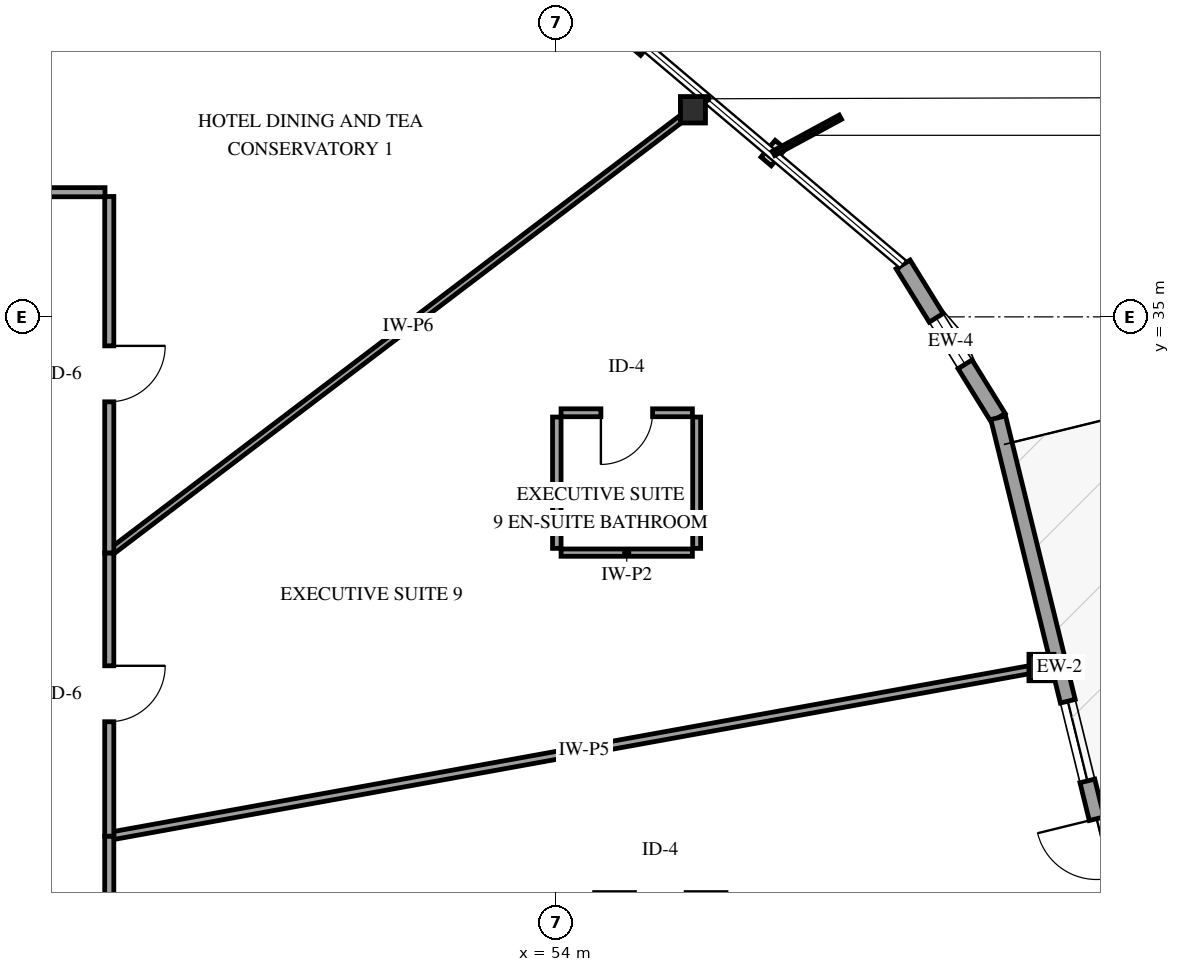
"""IFC4 building model, lengths in metres.
Left out: names, types, materials, properties, quantities, classifications, styles, units other than length and angle.
Written with IfcOpenShell. Run it as: python <this file> out.ifc"""

import sys

from ifc_helpers import new_model, si_unit, direction, frame, frame_2d, origin, origin_2d, place, context, subcontext, project, spatial, rectangle, i_section, extrude, element, fill, save


model = new_model("IFC4")
c1 = context("Model", 3, precision=1e-05, world=origin(), true_north=direction((0.0, 1.0)))
c2 = subcontext(c1, "Body", "Model", "MODEL_VIEW")
j1 = project(units=[si_unit("LENGTHUNIT", "METRE"), si_unit("PLANEANGLEUNIT", "RADIAN")], contexts=[c1])
p1 = place(None, origin())
s1 = spatial("IfcSite", under=j1, at=p1, CompositionType="ELEMENT")
p2 = place(p1, origin())
s2 = spatial("IfcBuilding", under=s1, at=p2, CompositionType="ELEMENT")
p3 = place(p2, frame((0.0, 0.0, 153.4)))
s3 = spatial("IfcBuildingStorey", under=s2, at=p3, CompositionType="ELEMENT", Elevation=153.4)
for number, where, z_axis, x_axis in (
    (1, (61.98, 29.234, 0.0), (0.0, 0.0, 1.0), (1.0, 0.0, 0.0)),
    (2, (56.249, 38.406, 0.0), (0.0, 0.0, 1.0), (1.0, 0.0, 0.0)),
):
    element("IfcColumn", number, at=place(p3, frame(where, z_axis=z_axis, x_axis=x_axis)), inside=s3, PredefinedType="COLUMN", context=c2, shape_type="SweptSolid", body=[
        extrude(i_section(OverallWidth=0.412, OverallDepth=0.435, WebThickness=0.036, FlangeThickness=0.057, FilletRadius=0.038, at=origin_2d()), origin(), (0.0, 0.0, 1.0), 3.6),
    ])
p4 = place(p3, frame((61.268, 33.342, 0.0), z_axis=(0.0, 0.0, 1.0), x_axis=(-0.526955124945, 0.849893108746, 0.0)))
e3 = element("IfcWall", 3, at=p4, inside=s3, PredefinedType="SOLIDWALL", context=c2, shape_type="SweptSolid", body=[
    extrude(rectangle(XDim=2.967, YDim=0.27, at=frame_2d((1.483, 0.0))), origin(), (0.0, 0.0, 1.0), 2.679),
])
p5 = place(p4, frame((1.033, 0.0, 0.75)))
e4 = element("IfcOpeningElement", 4, at=p5, cuts=e3, PredefinedType="OPENING", context=c2, shape_type="SweptSolid", body=[
    extrude(rectangle(XDim=0.9, YDim=1.5, at=frame_2d((0.45, 0.75))), frame((0.0, 0.145, 0.0), z_axis=(0.0, -1.0, 0.0), x_axis=(1.0, 0.0, 0.0)), (0.0, 0.0, 1.0), 0.29),
])
p6 = place(p3, frame((63.282, 25.145, 0.0), z_axis=(0.0, 0.0, 1.0), x_axis=(-0.238545314463, 0.971131367503, 0.0)))
e5 = element("IfcWall", 5, at=p6, inside=s3, PredefinedType="SOLIDWALL", context=c2, shape_type="SweptSolid", body=[
    extrude(rectangle(XDim=8.44, YDim=0.25, at=frame_2d((4.22, 0.0))), origin(), (0.0, 0.0, 1.0), 2.679),
])
p7 = place(p6, frame((0.65, 0.0, 0.0)))
e6 = element("IfcOpeningElement", 6, at=p7, cuts=e5, PredefinedType="OPENING", context=c2, shape_type="SweptSolid", body=[
    extrude(rectangle(XDim=1.0, YDim=2.15, at=frame_2d((0.5, 1.075))), frame((0.0, 0.135, 0.0), z_axis=(0.0, -1.0, 0.0), x_axis=(1.0, 0.0, 0.0)), (0.0, 0.0, 1.0), 0.27),
])
p8 = place(p6, frame((2.29, 0.0, 0.72)))
e7 = element("IfcOpeningElement", 7, at=p8, cuts=e5, PredefinedType="OPENING", context=c2, shape_type="SweptSolid", body=[
    extrude(rectangle(XDim=1.35, YDim=1.65, at=frame_2d((0.675, 0.825))), frame((0.0, 0.135, 0.0), z_axis=(0.0, -1.0, 0.0), x_axis=(1.0, 0.0, 0.0)), (0.0, 0.0, 1.0), 0.27),
])
p9 = place(p3, frame((62.265, 29.285, 0.0), z_axis=(0.0, 0.0, 1.0), x_axis=(-0.984004770571, -0.17814211039, 0.0)))
e8 = element("IfcWall", 8, at=p9, inside=s3, PredefinedType="PARTITIONING", context=c2, shape_type="SweptSolid", body=[
    extrude(rectangle(XDim=15.869, YDim=0.13, at=frame_2d((7.935, 0.0))), origin(), (0.0, 0.0, 1.0), 2.595),
])
p10 = place(p3, frame((46.65, 31.115, 0.0), z_axis=(0.0, 0.0, 1.0), x_axis=(0.796350735968, 0.604835105895, 0.0)))
e9 = element("IfcWall", 9, at=p10, inside=s3, PredefinedType="PARTITIONING", context=c2, shape_type="SweptSolid", body=[
    extrude(rectangle(XDim=12.349, YDim=0.11, at=frame_2d((6.174, 0.0))), origin(), (0.0, 0.0, 1.0), 3.3),
])
p11 = place(p3, frame((46.65, 36.98, 0.0), z_axis=(0.0, 0.0, 1.0), x_axis=(0.0, -1.0, 0.0)))
e10 = element("IfcWall", 10, at=p11, inside=s3, PredefinedType="PARTITIONING", context=c2, shape_type="SweptSolid", body=[
    extrude(rectangle(XDim=5.865, YDim=0.15, at=frame_2d((2.933, 0.0))), origin(), (0.0, 0.0, 1.0), 3.3),
])
p12 = place(p11, frame((2.457, 0.0, 0.0)))
e11 = element("IfcOpeningElement", 11, at=p12, cuts=e10, PredefinedType="OPENING", context=c2, shape_type="SweptSolid", body=[
    extrude(rectangle(XDim=0.92, YDim=2.12, at=frame_2d((0.46, 1.06))), frame((0.0, 0.085, 0.0), z_axis=(0.0, -1.0, 0.0), x_axis=(1.0, 0.0, 0.0)), (0.0, 0.0, 1.0), 0.17),
])
p13 = place(p3, frame((46.65, 31.115, 0.0), z_axis=(0.0, 0.0, 1.0), x_axis=(0.0, -1.0, 0.0)))
e12 = element("IfcWall", 12, at=p13, inside=s3, PredefinedType="PARTITIONING", context=c2, shape_type="SweptSolid", body=[
    extrude(rectangle(XDim=4.657, YDim=0.15, at=frame_2d((2.329, 0.0))), origin(), (0.0, 0.0, 1.0), 3.3),
])
p14 = place(p13, frame((1.853, 0.0, 0.0)))
e13 = element("IfcOpeningElement", 13, at=p14, cuts=e12, PredefinedType="OPENING", context=c2, shape_type="SweptSolid", body=[
    extrude(rectangle(XDim=0.92, YDim=2.12, at=frame_2d((0.46, 1.06))), frame((0.0, 0.085, 0.0), z_axis=(0.0, -1.0, 0.0), x_axis=(1.0, 0.0, 0.0)), (0.0, 0.0, 1.0), 0.17),
])
p15 = place(p3, frame((46.65, 26.458, 0.0), z_axis=(0.0, 0.0, 1.0), x_axis=(0.0, -1.0, 0.0)))
e14 = element("IfcWall", 14, at=p15, inside=s3, PredefinedType="PARTITIONING", context=c2, shape_type="SweptSolid", body=[
    extrude(rectangle(XDim=3.79, YDim=0.15, at=frame_2d((1.895, 0.0))), origin(), (0.0, 0.0, 1.0), 3.3),
])
p16 = place(p15, frame((1.42, 0.0, 0.0)))
e15 = element("IfcOpeningElement", 15, at=p16, cuts=e14, PredefinedType="OPENING", context=c2, shape_type="SweptSolid", body=[
    extrude(rectangle(XDim=0.92, YDim=2.12, at=frame_2d((0.46, 1.06))), frame((0.0, 0.085, 0.0), z_axis=(0.0, -1.0, 0.0), x_axis=(1.0, 0.0, 0.0)), (0.0, 0.0, 1.0), 0.17),
])
p17 = place(p3, frame((43.27, 37.05, 0.0), z_axis=(0.0, 0.0, 1.0), x_axis=(1.0, 0.0, 0.0)))
e16 = element("IfcWall", 16, at=p17, inside=s3, PredefinedType="PARTITIONING", context=c2, shape_type="SweptSolid", body=[
    extrude(rectangle(XDim=3.31, YDim=0.15, at=frame_2d((1.655, 0.0))), origin(), (0.0, 0.0, 1.0), 3.3),
])
p18 = place(p3, frame((56.24, 33.423, 0.0), z_axis=(0.0, 0.0, 1.0), x_axis=(-1.0, 0.0, 0.0)))
e17 = element("IfcWall", 17, at=p18, inside=s3, PredefinedType="PARTITIONING", context=c2, shape_type="SweptSolid", body=[
    extrude(rectangle(XDim=2.16, YDim=0.13, at=frame_2d((1.08, 0.0))), origin(), (0.0, 0.0, 1.0), 3.3),
])
p19 = place(p18, frame((0.655, 0.0, 0.0)))
e18 = element("IfcOpeningElement", 18, at=p19, cuts=e17, PredefinedType="OPENING", context=c2, shape_type="SweptSolid", body=[
    extrude(rectangle(XDim=0.85, YDim=2.1, at=frame_2d((0.425, 1.05))), frame((0.0, 0.075, 0.0), z_axis=(0.0, -1.0, 0.0), x_axis=(1.0, 0.0, 0.0)), (0.0, 0.0, 1.0), 0.15),
])
p20 = place(p3, frame((54.08, 31.123, 0.0), z_axis=(0.0, 0.0, 1.0), x_axis=(1.0, 0.0, 0.0)))
e19 = element("IfcWall", 19, at=p20, inside=s3, PredefinedType="PARTITIONING", context=c2, shape_type="SweptSolid", body=[
    extrude(rectangle(XDim=2.16, YDim=0.12, at=frame_2d((1.08, 0.0))), origin(), (0.0, 0.0, 1.0), 3.3),
])
p21 = place(p3, frame((54.01, 33.353, 0.0), z_axis=(0.0, 0.0, 1.0), x_axis=(0.0, -1.0, 0.0)))
e20 = element("IfcWall", 20, at=p21, inside=s3, PredefinedType="PARTITIONING", context=c2, shape_type="SweptSolid", body=[
    extrude(rectangle(XDim=2.16, YDim=0.14, at=frame_2d((1.08, 0.0))), origin(), (0.0, 0.0, 1.0), 3.3),
])
p22 = place(p3, frame((56.31, 31.193, 0.0), z_axis=(0.0, 0.0, 1.0), x_axis=(0.0, 1.0, 0.0)))
e21 = element("IfcWall", 21, at=p22, inside=s3, PredefinedType="PARTITIONING", context=c2, shape_type="SweptSolid", body=[
    extrude(rectangle(XDim=2.16, YDim=0.13, at=frame_2d((1.08, 0.0))), origin(), (0.0, 0.0, 1.0), 3.3),
])
p23 = place(p5, origin())
e22 = element("IfcWindow", 22, at=p23, inside=s3, PartitioningType="SINGLE_PANEL", PredefinedType="WINDOW", context=c2, shape_type="SweptSolid", body=[
    extrude(rectangle(XDim=0.9, YDim=1.5, at=frame_2d((0.45, 0.75))), frame((0.0, 0.03, 0.0), z_axis=(0.0, -1.0, 0.0), x_axis=(1.0, 0.0, 0.0)), (0.0, 0.0, 1.0), 0.06),
])
fill(e4, e22)
p24 = place(p7, origin())
e23 = element("IfcDoor", 23, at=p24, inside=s3, OperationType="SINGLE_SWING_RIGHT", PredefinedType="DOOR", context=c2, shape_type="SweptSolid", body=[
    extrude(rectangle(XDim=1.0, YDim=2.15, at=frame_2d((0.5, 1.075))), frame((0.0, 0.025, 0.0), z_axis=(0.0, -1.0, 0.0), x_axis=(1.0, 0.0, 0.0)), (0.0, 0.0, 1.0), 0.05),
])
fill(e6, e23)
p25 = place(p8, origin())
e24 = element("IfcWindow", 24, at=p25, inside=s3, PartitioningType="SINGLE_PANEL", PredefinedType="WINDOW", context=c2, shape_type="SweptSolid", body=[
    extrude(rectangle(XDim=1.35, YDim=1.65, at=frame_2d((0.675, 0.825))), frame((0.0, 0.03, 0.0), z_axis=(0.0, -1.0, 0.0), x_axis=(1.0, 0.0, 0.0)), (0.0, 0.0, 1.0), 0.06),
])
fill(e7, e24)
p26 = place(p12, origin())
e25 = element("IfcDoor", 25, at=p26, inside=s3, OperationType="SINGLE_SWING_LEFT", PredefinedType="DOOR", context=c2, shape_type="SweptSolid", body=[
    extrude(rectangle(XDim=0.92, YDim=2.12, at=frame_2d((0.46, 1.06))), frame((0.0, 0.025, 0.0), z_axis=(0.0, -1.0, 0.0), x_axis=(1.0, 0.0, 0.0)), (0.0, 0.0, 1.0), 0.05),
])
fill(e11, e25)
p27 = place(p14, origin())
e26 = element("IfcDoor", 26, at=p27, inside=s3, OperationType="SINGLE_SWING_LEFT", PredefinedType="DOOR", context=c2, shape_type="SweptSolid", body=[
    extrude(rectangle(XDim=0.92, YDim=2.12, at=frame_2d((0.46, 1.06))), frame((0.0, 0.025, 0.0), z_axis=(0.0, -1.0, 0.0), x_axis=(1.0, 0.0, 0.0)), (0.0, 0.0, 1.0), 0.05),
])
fill(e13, e26)
p28 = place(p19, origin())
e27 = element("IfcDoor", 27, at=p28, inside=s3, OperationType="SINGLE_SWING_RIGHT", PredefinedType="DOOR", context=c2, shape_type="SweptSolid", body=[
    extrude(rectangle(XDim=0.85, YDim=2.1, at=frame_2d((0.425, 1.05))), frame((0.0, 0.025, 0.0), z_axis=(0.0, -1.0, 0.0), x_axis=(1.0, 0.0, 0.0)), (0.0, 0.0, 1.0), 0.05),
])
fill(e18, e27)
save(model, sys.argv[1])
